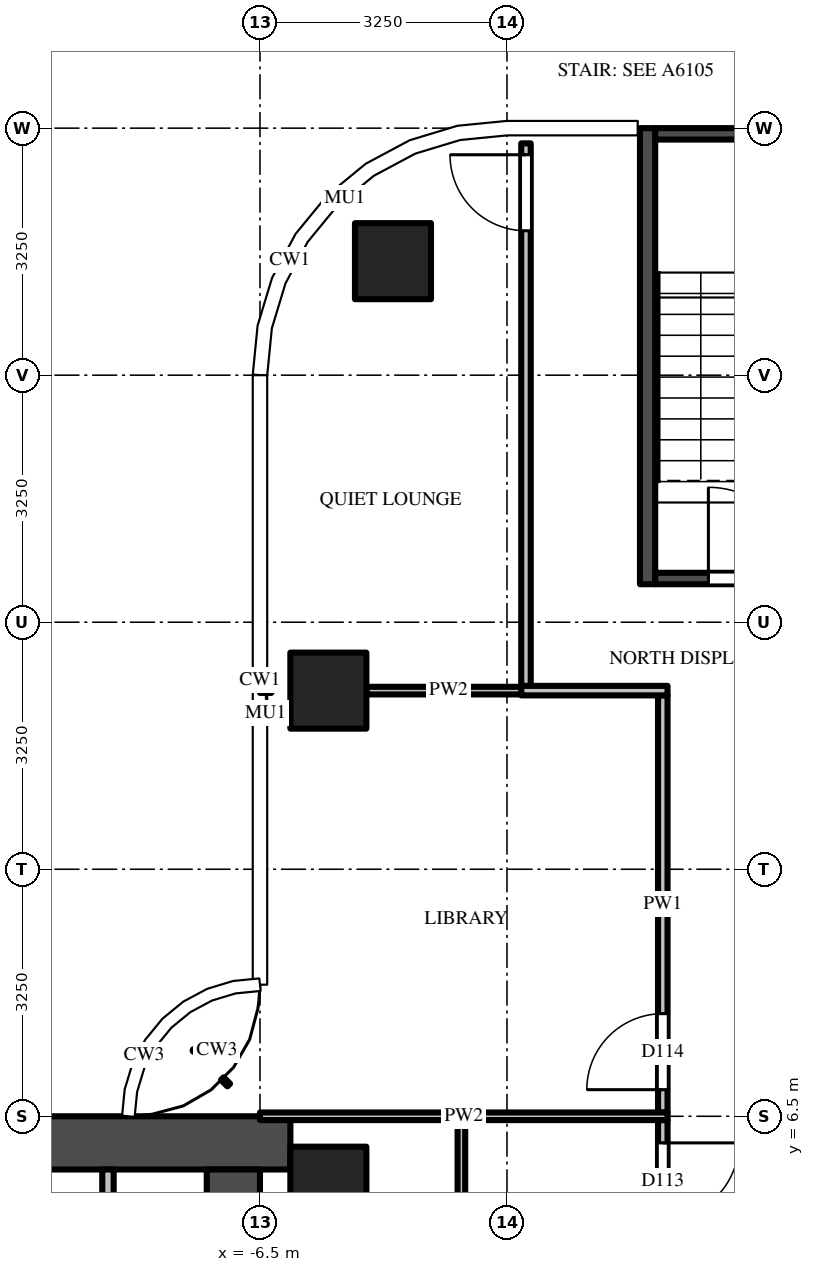
"""IFC4 building model, lengths in metres.
Left out: names, types, materials, properties, quantities, classifications, styles, units other than length and angle.
Written with IfcOpenShell. Run it as: python <this file> out.ifc"""

import sys

from ifc_helpers import new_model, si_unit, direction, frame, frame_2d, origin, origin_2d, place, context, subcontext, project, spatial, rectangle, extrude, source, transform, mapped, element, fill, save


model = new_model("IFC4")
c1 = context("Model", 3, precision=1e-05, world=origin(), true_north=direction((0.0, 1.0)))
c2 = subcontext(c1, "Body", "Model", "MODEL_VIEW")
j1 = project(units=[si_unit("LENGTHUNIT", "METRE"), si_unit("PLANEANGLEUNIT", "RADIAN")], contexts=[c1])
p1 = place(None, origin())
s1 = spatial("IfcSite", under=j1, at=p1, CompositionType="ELEMENT")
p2 = place(p1, origin())
s2 = spatial("IfcBuilding", under=s1, at=p2, CompositionType="ELEMENT")
p3 = place(p2, frame((0.0, 0.0, 306.7)))
s3 = spatial("IfcBuildingStorey", under=s2, at=p3, CompositionType="ELEMENT", Elevation=306.7)
m1 = source(origin(), c2, "Body", "SweptSolid", [
    extrude(rectangle(XDim=1.0, YDim=1.0, at=origin_2d()), origin(), (0.0, 0.0, 1.0), 3.9),
])
for number, where, z_axis, x_axis in (
    (1, (-5.6, 12.1, 0.0), (0.0, 0.0, 1.0), (1.0, 0.0, 0.0)),
    (2, (-4.75, 17.75, 0.0), (0.0, 0.0, 1.0), (1.0, 0.0, 0.0)),
    (3, (-5.6, 5.6, 0.0), (0.0, 0.0, 1.0), (1.0, 0.0, 0.0)),
):
    element("IfcColumn", number, at=place(p3, frame(where, z_axis=z_axis, x_axis=x_axis)), inside=s3, PredefinedType="COLUMN", context=c2, shape_type="MappedRepresentation", body=[
        mapped(m1, transform((0.0, 0.0, 0.0))),
    ])
m2 = source(origin(), c2, "Body", "SweptSolid", [
    extrude(rectangle(XDim=16.65, YDim=0.7, at=frame_2d((8.325, 0.0))), origin(), (0.0, 0.0, 1.0), 3.7),
])
p4 = place(p3, frame((-6.1, 6.15, 0.0), z_axis=(0.0, 0.0, 1.0), x_axis=(-1.0, 0.0, 0.0)))
e4 = element("IfcWall", 4, at=p4, inside=s3, PredefinedType="SHEAR", context=c2, shape_type="MappedRepresentation", body=[
    mapped(m2, transform((0.0, 0.0, 0.0))),
])
m3 = source(origin(), c2, "Body", "SweptSolid", [
    extrude(rectangle(XDim=9.05, YDim=0.7, at=frame_2d((4.525, 0.0))), origin(), (0.0, 0.0, 1.0), 3.7),
])
p5 = place(p3, frame((-6.85, 5.8, 0.0), z_axis=(0.0, 0.0, 1.0), x_axis=(0.0, -1.0, 0.0)))
e5 = element("IfcWall", 5, at=p5, inside=s3, PredefinedType="SHEAR", context=c2, shape_type="MappedRepresentation", body=[
    mapped(m3, transform((0.0, 0.0, 0.0))),
])
m4 = source(origin(), c2, "Body", "SweptSolid", [
    extrude(rectangle(XDim=1.8, YDim=2.1, at=frame_2d((0.9, 1.05))), frame((0.0, 0.36, 0.0), z_axis=(0.0, -1.0, 0.0), x_axis=(1.0, 0.0, 0.0)), (0.0, 0.0, 1.0), 0.72),
])
p6 = place(p5, frame((3.15, 0.0, 0.0)))
e6 = element("IfcOpeningElement", 6, at=p6, cuts=e5, PredefinedType="OPENING", context=c2, shape_type="MappedRepresentation", body=[
    mapped(m4, transform((0.0, 0.0, 0.0))),
])
m5 = source(origin(), c2, "Body", "SweptSolid", [
    extrude(rectangle(XDim=2.2, YDim=0.15, at=frame_2d((1.1, 0.0))), origin(), (0.0, 0.0, 1.0), 3.7),
])
p7 = place(p3, frame((-8.5, 5.8, 0.0), z_axis=(0.0, 0.0, 1.0), x_axis=(0.0, -1.0, 0.0)))
e7 = element("IfcWall", 7, at=p7, inside=s3, PredefinedType="PARTITIONING", context=c2, shape_type="MappedRepresentation", body=[
    mapped(m5, transform((0.0, 0.0, 0.0))),
])
m6 = source(origin(), c2, "Body", "SweptSolid", [
    extrude(rectangle(XDim=6.0, YDim=0.2, at=frame_2d((3.0, 0.0))), origin(), (0.0, 0.0, 1.0), 3.7),
])
p8 = place(p3, frame((-1.4, 13.5, 0.0), z_axis=(0.0, 0.0, 1.0), x_axis=(0.0, 1.0, 0.0)))
e8 = element("IfcWall", 8, at=p8, inside=s3, PredefinedType="SHEAR", context=c2, shape_type="MappedRepresentation", body=[
    mapped(m6, transform((0.0, 0.0, 0.0))),
])
m7 = source(origin(), c2, "Body", "SweptSolid", [
    extrude(rectangle(XDim=2.6, YDim=0.15, at=frame_2d((1.3, 0.0))), origin(), (0.0, 0.0, 1.0), 3.7),
])
p9 = place(p3, frame((-1.3, 13.575, 0.0), z_axis=(0.0, 0.0, 1.0), x_axis=(1.0, 0.0, 0.0)))
e9 = element("IfcWall", 9, at=p9, inside=s3, PredefinedType="SHEAR", context=c2, shape_type="MappedRepresentation", body=[
    mapped(m7, transform((0.0, 0.0, 0.0))),
])
m8 = source(origin(), c2, "Body", "SweptSolid", [
    extrude(rectangle(XDim=1.2, YDim=2.1, at=frame_2d((0.6, 1.05))), frame((0.0, 0.085, 0.0), z_axis=(0.0, -1.0, 0.0), x_axis=(1.0, 0.0, 0.0)), (0.0, 0.0, 1.0), 0.17),
])
p10 = place(p9, frame((0.7, 0.0, 0.0)))
e10 = element("IfcOpeningElement", 10, at=p10, cuts=e9, PredefinedType="OPENING", context=c2, shape_type="MappedRepresentation", body=[
    mapped(m8, transform((0.0, 0.0, 0.0))),
])
p11 = place(p3, frame((-1.3, 19.425, 0.0), z_axis=(0.0, 0.0, 1.0), x_axis=(1.0, 0.0, 0.0)))
e11 = element("IfcWall", 11, at=p11, inside=s3, PredefinedType="SHEAR", context=c2, shape_type="MappedRepresentation", body=[
    mapped(m7, transform((0.0, 0.0, 0.0))),
])
m9 = source(origin(), c2, "Body", "SweptSolid", [
    extrude(rectangle(XDim=3.137, YDim=0.1, at=frame_2d((1.569, 0.0))), origin(), (0.0, 0.0, 1.0), 2.997),
])
p12 = place(p3, frame((-3.85, 3.312, 0.0), z_axis=(0.0, 0.0, 1.0), x_axis=(0.0, 1.0, 0.0)))
e12 = element("IfcWall", 12, at=p12, inside=s3, PredefinedType="PARTITIONING", context=c2, shape_type="MappedRepresentation", body=[
    mapped(m9, transform((0.0, 0.0, 0.0))),
])
m10 = source(origin(), c2, "Body", "SweptSolid", [
    extrude(rectangle(XDim=7.15, YDim=0.125, at=frame_2d((3.575, 0.0))), origin(), (0.0, 0.0, 1.0), 2.78),
])
p13 = place(p3, frame((-3.0, 12.15, 0.0), z_axis=(0.0, 0.0, 1.0), x_axis=(0.0, 1.0, 0.0)))
e13 = element("IfcWall", 13, at=p13, inside=s3, PredefinedType="PARTITIONING", context=c2, shape_type="MappedRepresentation", body=[
    mapped(m10, transform((0.0, 0.0, 0.0))),
])
m11 = source(origin(), c2, "Body", "SweptSolid", [
    extrude(rectangle(XDim=1.0, YDim=2.1, at=frame_2d((0.5, 1.05))), frame((0.0, 0.073, 0.0), z_axis=(0.0, -1.0, 0.0), x_axis=(1.0, 0.0, 0.0)), (0.0, 0.0, 1.0), 0.145),
])
p14 = place(p13, frame((6.0, 0.0, 0.0)))
e14 = element("IfcOpeningElement", 14, at=p14, cuts=e13, PredefinedType="OPENING", context=c2, shape_type="MappedRepresentation", body=[
    mapped(m11, transform((0.0, 0.0, 0.0))),
])
m12 = source(origin(), c2, "Body", "SweptSolid", [
    extrude(rectangle(XDim=3.137, YDim=0.125, at=frame_2d((1.569, 0.0))), origin(), (0.0, 0.0, 1.0), 2.997),
])
p15 = place(p3, frame((-1.2, 6.45, 0.0), z_axis=(0.0, 0.0, 1.0), x_axis=(0.0, -1.0, 0.0)))
e15 = element("IfcWall", 15, at=p15, inside=s3, PredefinedType="PARTITIONING", context=c2, shape_type="MappedRepresentation", body=[
    mapped(m12, transform((0.0, 0.0, 0.0))),
])
p16 = place(p15, frame((0.3, 0.0, 0.0)))
e16 = element("IfcOpeningElement", 16, at=p16, cuts=e15, PredefinedType="OPENING", context=c2, shape_type="MappedRepresentation", body=[
    mapped(m11, transform((0.0, 0.0, 0.0))),
])
m13 = source(origin(), c2, "Body", "SweptSolid", [
    extrude(rectangle(XDim=5.488, YDim=0.125, at=frame_2d((2.744, 0.0))), origin(), (0.0, 0.0, 1.0), 2.997),
])
p17 = place(p3, frame((-1.2, 6.55, 0.0), z_axis=(0.0, 0.0, 1.0), x_axis=(0.0, 1.0, 0.0)))
e17 = element("IfcWall", 17, at=p17, inside=s3, PredefinedType="PARTITIONING", context=c2, shape_type="MappedRepresentation", body=[
    mapped(m13, transform((0.0, 0.0, 0.0))),
])
p18 = place(p17, frame((0.3, 0.0, 0.0)))
e18 = element("IfcOpeningElement", 18, at=p18, cuts=e17, PredefinedType="OPENING", context=c2, shape_type="MappedRepresentation", body=[
    mapped(m11, transform((0.0, 0.0, 0.0))),
])
m14 = source(origin(), c2, "Body", "SweptSolid", [
    extrude(rectangle(XDim=5.363, YDim=0.1, at=frame_2d((2.681, 0.0))), origin(), (0.0, 0.0, 1.0), 2.78),
])
p19 = place(p3, frame((-6.5, 6.5, 0.0), z_axis=(0.0, 0.0, 1.0), x_axis=(1.0, 0.0, 0.0)))
e19 = element("IfcWall", 19, at=p19, inside=s3, PredefinedType="PARTITIONING", context=c2, shape_type="MappedRepresentation", body=[
    mapped(m14, transform((0.0, 0.0, 0.0))),
])
m15 = source(origin(), c2, "Body", "SweptSolid", [
    extrude(rectangle(XDim=2.163, YDim=0.1, at=frame_2d((1.081, 0.0))), origin(), (0.0, 0.0, 1.0), 2.997),
])
p20 = place(p3, frame((-5.1, 12.1, 0.0), z_axis=(0.0, 0.0, 1.0), x_axis=(1.0, 0.0, 0.0)))
e20 = element("IfcWall", 20, at=p20, inside=s3, PredefinedType="PARTITIONING", context=c2, shape_type="MappedRepresentation", body=[
    mapped(m15, transform((0.0, 0.0, 0.0))),
])
m16 = source(origin(), c2, "Body", "SweptSolid", [
    extrude(rectangle(XDim=1.925, YDim=0.125, at=frame_2d((0.962, 0.0))), origin(), (0.0, 0.0, 1.0), 2.997),
])
p21 = place(p3, frame((-1.137, 12.1, 0.0), z_axis=(0.0, 0.0, 1.0), x_axis=(-1.0, 0.0, 0.0)))
e21 = element("IfcWall", 21, at=p21, inside=s3, PredefinedType="PARTITIONING", context=c2, shape_type="MappedRepresentation", body=[
    mapped(m16, transform((0.0, 0.0, 0.0))),
])
m17 = source(origin(), c2, "Body", "SweptSolid", [
    extrude(rectangle(XDim=1.2, YDim=2.1, at=frame_2d((0.6, 1.05))), frame((0.0, 0.025, 0.0), z_axis=(0.0, -1.0, 0.0), x_axis=(1.0, 0.0, 0.0)), (0.0, 0.0, 1.0), 0.05),
])
p22 = place(p10, origin())
e22 = element("IfcDoor", 22, at=p22, inside=s3, OperationType="SINGLE_SWING_LEFT", PredefinedType="DOOR", context=c2, shape_type="MappedRepresentation", body=[
    mapped(m17, transform((0.0, 0.0, 0.0))),
])
fill(e10, e22)
m18 = source(origin(), c2, "Body", "SweptSolid", [
    extrude(rectangle(XDim=1.0, YDim=2.1, at=frame_2d((0.5, 1.05))), frame((0.0, 0.025, 0.0), z_axis=(0.0, -1.0, 0.0), x_axis=(1.0, 0.0, 0.0)), (0.0, 0.0, 1.0), 0.05),
])
p23 = place(p16, origin())
e23 = element("IfcDoor", 23, at=p23, inside=s3, OperationType="SINGLE_SWING_LEFT", PredefinedType="DOOR", context=c2, shape_type="MappedRepresentation", body=[
    mapped(m18, transform((0.0, 0.0, 0.0))),
])
fill(e16, e23)
p24 = place(p18, origin())
e24 = element("IfcDoor", 24, at=p24, inside=s3, OperationType="SINGLE_SWING_LEFT", PredefinedType="DOOR", context=c2, shape_type="MappedRepresentation", body=[
    mapped(m18, transform((0.0, 0.0, 0.0))),
])
fill(e18, e24)
p25 = place(p14, origin())
e25 = element("IfcDoor", 25, at=p25, inside=s3, OperationType="SINGLE_SWING_RIGHT", PredefinedType="DOOR", context=c2, shape_type="MappedRepresentation", body=[
    mapped(m18, transform((0.0, 0.0, 0.0))),
])
fill(e14, e25)
save(model, sys.argv[1])
